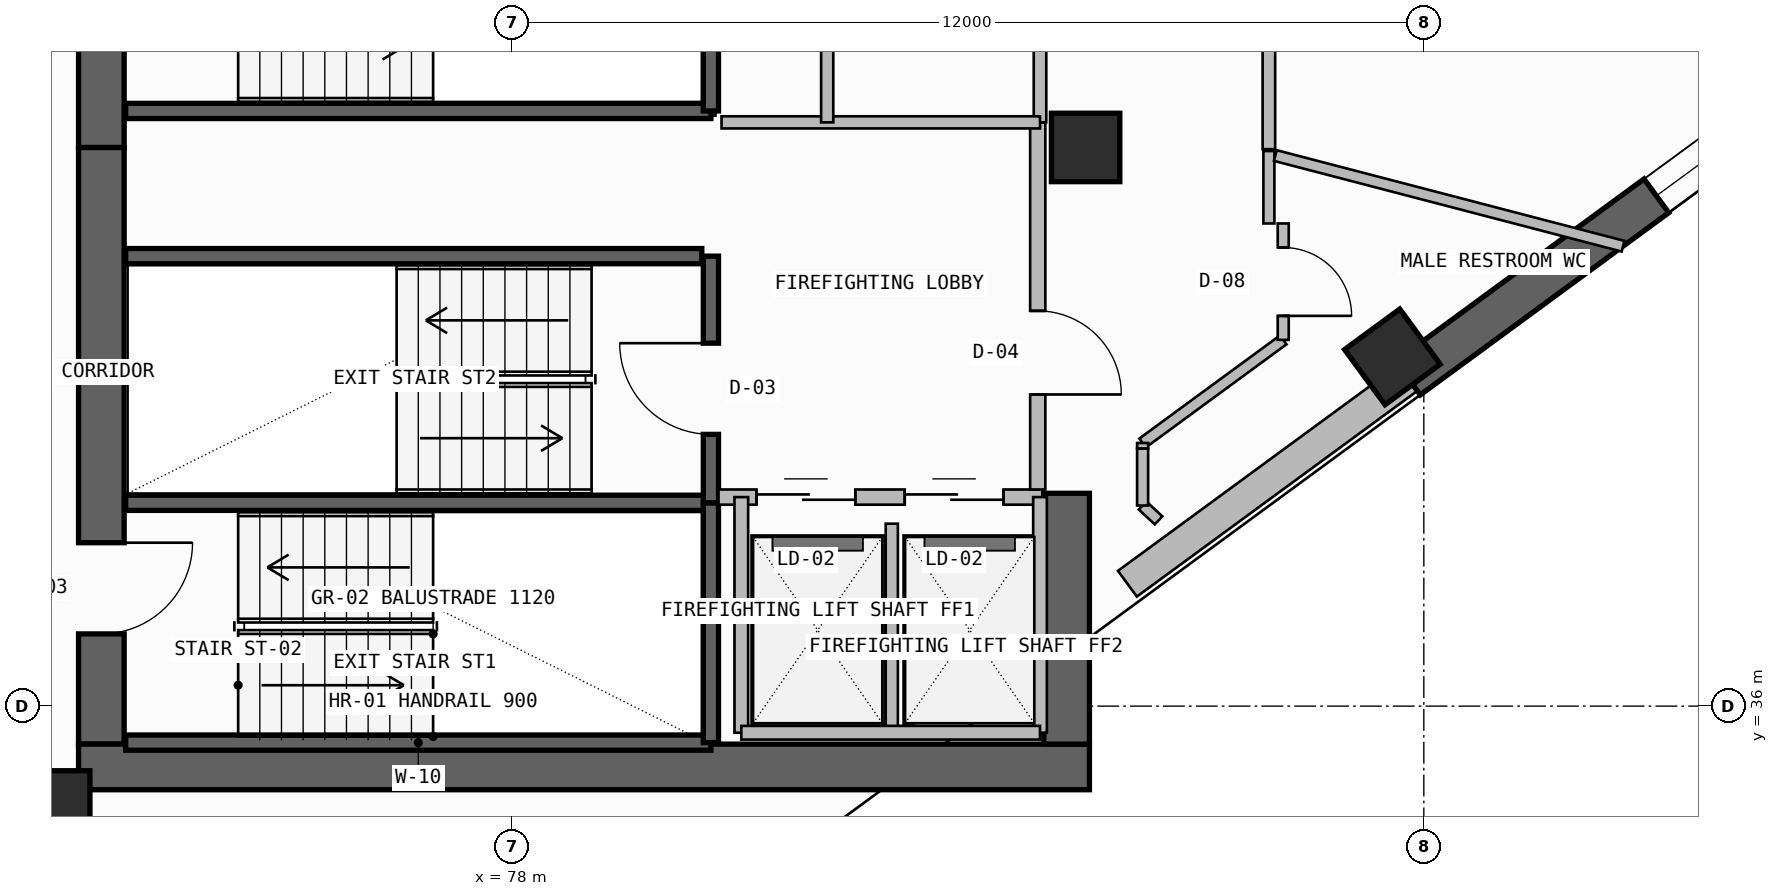
"""IFC4 building model, lengths in metres.
Left out: names, types, materials, properties, quantities, classifications, styles, units other than length and angle.
Written with IfcOpenShell. Run it as: python <this file> out.ifc"""

import sys

from ifc_helpers import new_model, si_unit, direction, frame, frame_2d, origin, origin_2d, place, context, subcontext, project, spatial, rectangle, extrude, element, fill, save


model = new_model("IFC4")
c1 = context("Model", 3, precision=1e-05, world=origin(), true_north=direction((0.0, 1.0)))
c2 = subcontext(c1, "Body", "Model", "MODEL_VIEW")
j1 = project(units=[si_unit("LENGTHUNIT", "METRE"), si_unit("PLANEANGLEUNIT", "RADIAN")], contexts=[c1])
p1 = place(None, origin())
s1 = spatial("IfcSite", under=j1, at=p1, CompositionType="ELEMENT")
p2 = place(p1, origin())
s2 = spatial("IfcBuilding", under=s1, at=p2, CompositionType="ELEMENT")
p3 = place(p2, frame((0.0, 0.0, 257.22)))
s3 = spatial("IfcBuildingStorey", under=s2, at=p3, CompositionType="ELEMENT", Elevation=257.22)
p4 = place(p3, frame((72.6, 35.5, -0.26), z_axis=(0.0, 0.0, 1.0), x_axis=(0.0, 1.0, 0.0)))
e1 = element("IfcWall", 1, at=p4, inside=s3, PredefinedType="SHEAR", context=c2, shape_type="SweptSolid", body=[
    extrude(rectangle(XDim=7.85, YDim=0.6, at=frame_2d((3.925, 0.0))), origin(), (0.0, 0.0, 1.0), 3.52),
])
p5 = place(p4, frame((1.45, 0.0, 0.26)))
e2 = element("IfcOpeningElement", 2, at=p5, cuts=e1, PredefinedType="OPENING", context=c2, shape_type="SweptSolid", body=[
    extrude(rectangle(XDim=1.2, YDim=2.2, at=frame_2d((0.6, 1.1))), frame((0.0, 0.31, 0.0), z_axis=(0.0, -1.0, 0.0), x_axis=(1.0, 0.0, 0.0)), (0.0, 0.0, 1.0), 0.62),
])
p6 = place(p3, frame((72.3, 35.2, -0.26), z_axis=(0.0, 0.0, 1.0), x_axis=(1.0, 0.0, 0.0)))
e3 = element("IfcWall", 3, at=p6, inside=s3, PredefinedType="SHEAR", context=c2, shape_type="SweptSolid", body=[
    extrude(rectangle(XDim=13.3, YDim=0.6, at=frame_2d((6.65, 0.0))), origin(), (0.0, 0.0, 1.0), 3.52),
])
p7 = place(p3, frame((85.3, 35.5, -0.26), z_axis=(0.0, 0.0, 1.0), x_axis=(0.0, 1.0, 0.0)))
e4 = element("IfcWall", 4, at=p7, inside=s3, PredefinedType="SHEAR", context=c2, shape_type="SweptSolid", body=[
    extrude(rectangle(XDim=3.3, YDim=0.6, at=frame_2d((1.65, 0.0))), origin(), (0.0, 0.0, 1.0), 3.52),
])
p8 = place(p3, frame((72.6, 43.35, -0.26), z_axis=(0.0, 0.0, 1.0), x_axis=(0.0, 1.0, 0.0)))
e5 = element("IfcWall", 5, at=p8, inside=s3, PredefinedType="SHEAR", context=c2, shape_type="SweptSolid", body=[
    extrude(rectangle(XDim=12.7, YDim=0.6, at=frame_2d((6.35, 0.0))), origin(), (0.0, 0.0, 1.0), 3.52),
])
p9 = place(p8, frame((1.35, 0.0, 0.26)))
e6 = element("IfcOpeningElement", 6, at=p9, cuts=e5, PredefinedType="OPENING", context=c2, shape_type="SweptSolid", body=[
    extrude(rectangle(XDim=1.2, YDim=2.2, at=frame_2d((0.6, 1.1))), frame((0.0, 0.31, 0.0), z_axis=(0.0, -1.0, 0.0), x_axis=(1.0, 0.0, 0.0)), (0.0, 0.0, 1.0), 0.62),
])
for number, where, z_axis, x_axis in (
    (7, (72.0, 34.7, 0.0), (0.0, 0.0, 1.0), (1.0, 0.0, 0.0)),
    (8, (85.55, 43.35, 0.0), (0.0, 0.0, 1.0), (1.0, 0.0, 0.0)),
    (9, (89.586, 40.594, 0.0), (0.0, 0.0, 1.0), (0.806, 0.591, 0.0)),
):
    element("IfcColumn", number, at=place(p3, frame(where, z_axis=z_axis, x_axis=x_axis)), inside=s3, PredefinedType="COLUMN", context=c2, shape_type="SweptSolid", body=[
        extrude(rectangle(XDim=0.9, YDim=0.9, at=origin_2d()), origin(), (0.0, 0.0, 1.0), 3.52),
    ])
p10 = place(p3, frame((86.1, 37.61, 0.0), z_axis=(0.0, 0.0, 1.0), x_axis=(0.806432132361, 0.591326657521, 0.0)))
e10 = element("IfcWall", 10, at=p10, inside=s3, PredefinedType="SOLIDWALL", context=c2, shape_type="SweptSolid", body=[
    extrude(rectangle(XDim=4.576, YDim=0.42, at=frame_2d((2.288, 0.0))), origin(), (0.0, 0.0, 1.0), 2.245),
])
p11 = place(p3, frame((89.791, 40.316, -0.26), z_axis=(0.0, 0.0, 1.0), x_axis=(0.806449218078, 0.591303355868, 0.0)))
e11 = element("IfcWall", 11, at=p11, inside=s3, PredefinedType="SHEAR", context=c2, shape_type="SweptSolid", body=[
    extrude(rectangle(XDim=16.673, YDim=0.55, at=frame_2d((8.336, 0.0))), origin(), (0.0, 0.0, 1.0), 3.52),
])
p12 = place(p11, frame((4.054, 0.0, 1.1)))
e12 = element("IfcOpeningElement", 12, at=p12, cuts=e11, PredefinedType="OPENING", context=c2, shape_type="SweptSolid", body=[
    extrude(rectangle(XDim=2.4, YDim=1.2, at=frame_2d((1.2, 0.6))), frame((0.0, 0.285, 0.0), z_axis=(0.0, -1.0, 0.0), x_axis=(1.0, 0.0, 0.0)), (0.0, 0.0, 1.0), 0.57),
])
for number, where, z_axis, x_axis in (
    (13, (72.92, 35.52, -0.26), (0.0, 0.0, 1.0), (1.0, 0.0, 0.0)),
    (14, (72.92, 38.675, -0.26), (0.0, 0.0, 1.0), (1.0, 0.0, 0.0)),
):
    element("IfcWall", number, at=place(p3, frame(where, z_axis=z_axis, x_axis=x_axis)), inside=s3, PredefinedType="SOLIDWALL", context=c2, shape_type="SweptSolid", body=[
        extrude(rectangle(XDim=7.7, YDim=0.2, at=frame_2d((3.85, 0.0))), origin(), (0.0, 0.0, 1.0), 3.52),
    ])
p13 = place(p3, frame((80.62, 35.52, -0.26), z_axis=(0.0, 0.0, 1.0), x_axis=(0.0, 1.0, 0.0)))
e15 = element("IfcWall", 15, at=p13, inside=s3, PredefinedType="SOLIDWALL", context=c2, shape_type="SweptSolid", body=[
    extrude(rectangle(XDim=3.155, YDim=0.2, at=frame_2d((1.578, 0.0))), origin(), (0.0, 0.0, 1.0), 3.52),
])
p14 = place(p3, frame((80.62, 38.675, -0.26), z_axis=(0.0, 0.0, 1.0), x_axis=(0.0, 1.0, 0.0)))
e16 = element("IfcWall", 16, at=p14, inside=s3, PredefinedType="SOLIDWALL", context=c2, shape_type="SweptSolid", body=[
    extrude(rectangle(XDim=3.245, YDim=0.2, at=frame_2d((1.623, 0.0))), origin(), (0.0, 0.0, 1.0), 3.52),
])
p15 = place(p14, frame((0.9, 0.0, 0.26)))
e17 = element("IfcOpeningElement", 17, at=p15, cuts=e16, PredefinedType="OPENING", context=c2, shape_type="SweptSolid", body=[
    extrude(rectangle(XDim=1.2, YDim=2.2, at=frame_2d((0.6, 1.1))), frame((0.0, 0.11, 0.0), z_axis=(0.0, -1.0, 0.0), x_axis=(1.0, 0.0, 0.0)), (0.0, 0.0, 1.0), 0.22),
])
p16 = place(p3, frame((80.72, 38.75, 0.0), z_axis=(0.0, 0.0, 1.0), x_axis=(1.0, 0.0, 0.0)))
e18 = element("IfcWall", 18, at=p16, inside=s3, PredefinedType="SOLIDWALL", context=c2, shape_type="SweptSolid", body=[
    extrude(rectangle(XDim=4.26, YDim=0.2, at=frame_2d((2.13, 0.0))), origin(), (0.0, 0.0, 1.0), 3.26),
])
p17 = place(p16, frame((0.5, 0.0, 0.0)))
e19 = element("IfcOpeningElement", 19, at=p17, cuts=e18, PredefinedType="OPENING", context=c2, shape_type="SweptSolid", body=[
    extrude(rectangle(XDim=1.3, YDim=2.3, at=frame_2d((0.65, 1.15))), frame((0.0, 0.11, 0.0), z_axis=(0.0, -1.0, 0.0), x_axis=(1.0, 0.0, 0.0)), (0.0, 0.0, 1.0), 0.22),
])
p18 = place(p16, frame((2.45, 0.0, 0.0)))
e20 = element("IfcOpeningElement", 20, at=p18, cuts=e18, PredefinedType="OPENING", context=c2, shape_type="SweptSolid", body=[
    extrude(rectangle(XDim=1.3, YDim=2.3, at=frame_2d((0.65, 1.15))), frame((0.0, 0.11, 0.0), z_axis=(0.0, -1.0, 0.0), x_axis=(1.0, 0.0, 0.0)), (0.0, 0.0, 1.0), 0.22),
])
p19 = place(p3, frame((83.0, 35.65, 0.0), z_axis=(0.0, 0.0, 1.0), x_axis=(0.0, 1.0, 0.0)))
e21 = element("IfcWall", 21, at=p19, inside=s3, PredefinedType="PLUMBINGWALL", context=c2, shape_type="SweptSolid", body=[
    extrude(rectangle(XDim=2.75, YDim=0.16, at=frame_2d((1.375, 0.0))), origin(), (0.0, 0.0, 1.0), 3.26),
])
for number, where, z_axis, x_axis in (
    (22, (84.95, 35.65, 0.0), (0.0, 0.0, 1.0), (0.0, 1.0, 0.0)),
    (23, (81.02, 35.65, 0.0), (0.0, 0.0, 1.0), (0.0, 1.0, 0.0)),
):
    element("IfcWall", number, at=place(p3, frame(where, z_axis=z_axis, x_axis=x_axis)), inside=s3, PredefinedType="SOLIDWALL", context=c2, shape_type="SweptSolid", body=[
        extrude(rectangle(XDim=3.1, YDim=0.18, at=frame_2d((1.55, 0.0))), origin(), (0.0, 0.0, 1.0), 3.26),
    ])
p20 = place(p3, frame((81.02, 35.65, 0.0), z_axis=(0.0, 0.0, 1.0), x_axis=(1.0, 0.0, 0.0)))
e24 = element("IfcWall", 24, at=p20, inside=s3, PredefinedType="SOLIDWALL", context=c2, shape_type="SweptSolid", body=[
    extrude(rectangle(XDim=3.93, YDim=0.18, at=frame_2d((1.965, 0.0))), origin(), (0.0, 0.0, 1.0), 3.26),
])
p21 = place(p3, frame((84.92, 38.85, 0.0), z_axis=(0.0, 0.0, 1.0), x_axis=(0.0, 1.0, 0.0)))
e25 = element("IfcWall", 25, at=p21, inside=s3, PredefinedType="SOLIDWALL", context=c2, shape_type="SweptSolid", body=[
    extrude(rectangle(XDim=4.83, YDim=0.2, at=frame_2d((2.415, 0.0))), origin(), (0.0, 0.0, 1.0), 3.26),
])
p22 = place(p21, frame((1.25, 0.0, 0.0)))
e26 = element("IfcOpeningElement", 26, at=p22, cuts=e25, PredefinedType="OPENING", context=c2, shape_type="SweptSolid", body=[
    extrude(rectangle(XDim=1.1, YDim=2.2, at=frame_2d((0.55, 1.1))), frame((0.0, 0.11, 0.0), z_axis=(0.0, -1.0, 0.0), x_axis=(1.0, 0.0, 0.0)), (0.0, 0.0, 1.0), 0.22),
])
p23 = place(p3, frame((72.92, 41.92, -0.26), z_axis=(0.0, 0.0, 1.0), x_axis=(1.0, 0.0, 0.0)))
e27 = element("IfcWall", 27, at=p23, inside=s3, PredefinedType="SOLIDWALL", context=c2, shape_type="SweptSolid", body=[
    extrude(rectangle(XDim=7.58, YDim=0.2, at=frame_2d((3.79, 0.0))), origin(), (0.0, 0.0, 1.0), 3.52),
])
p24 = place(p3, frame((72.92, 43.83, -0.26), z_axis=(0.0, 0.0, 1.0), x_axis=(1.0, 0.0, 0.0)))
e28 = element("IfcWall", 28, at=p24, inside=s3, PredefinedType="SOLIDWALL", context=c2, shape_type="SweptSolid", body=[
    extrude(rectangle(XDim=7.7, YDim=0.2, at=frame_2d((3.85, 0.0))), origin(), (0.0, 0.0, 1.0), 3.52),
])
p25 = place(p3, frame((80.62, 43.83, -0.26), z_axis=(0.0, 0.0, 1.0), x_axis=(0.0, 1.0, 0.0)))
e29 = element("IfcWall", 29, at=p25, inside=s3, PredefinedType="SOLIDWALL", context=c2, shape_type="SweptSolid", body=[
    extrude(rectangle(XDim=3.24, YDim=0.2, at=frame_2d((1.62, 0.0))), origin(), (0.0, 0.0, 1.0), 3.52),
])
p26 = place(p3, frame((84.95, 43.68, 0.0), z_axis=(0.0, 0.0, 1.0), x_axis=(0.0, 1.0, 0.0)))
e30 = element("IfcWall", 30, at=p26, inside=s3, PredefinedType="PLUMBINGWALL", context=c2, shape_type="SweptSolid", body=[
    extrude(rectangle(XDim=1.9, YDim=0.165, at=frame_2d((0.95, 0.0))), origin(), (0.0, 0.0, 1.0), 3.26),
])
p27 = place(p3, frame((80.76, 43.68, 0.0), z_axis=(0.0, 0.0, 1.0), x_axis=(1.0, 0.0, 0.0)))
e31 = element("IfcWall", 31, at=p27, inside=s3, PredefinedType="PLUMBINGWALL", context=c2, shape_type="SweptSolid", body=[
    extrude(rectangle(XDim=4.19, YDim=0.16, at=frame_2d((2.095, 0.0))), origin(), (0.0, 0.0, 1.0), 3.26),
])
p28 = place(p3, frame((82.15, 43.68, 0.0), z_axis=(0.0, 0.0, 1.0), x_axis=(0.0, 1.0, 0.0)))
e32 = element("IfcWall", 32, at=p28, inside=s3, PredefinedType="PLUMBINGWALL", context=c2, shape_type="SweptSolid", body=[
    extrude(rectangle(XDim=1.9, YDim=0.16, at=frame_2d((0.95, 0.0))), origin(), (0.0, 0.0, 1.0), 3.26),
])
p29 = place(p3, frame((86.3, 39.462, 0.0), z_axis=(0.0, 0.0, 1.0), x_axis=(0.80642868075, 0.591331364689, 0.0)))
e33 = element("IfcWall", 33, at=p29, inside=s3, PredefinedType="PARTITIONING", context=c2, shape_type="SweptSolid", body=[
    extrude(rectangle(XDim=2.294, YDim=0.145, at=frame_2d((1.147, 0.0))), origin(), (0.0, 0.0, 1.0), 3.26),
])
p30 = place(p3, frame((88.15, 40.818, 0.0), z_axis=(0.0, 0.0, 1.0), x_axis=(0.0, 1.0, 0.0)))
e34 = element("IfcWall", 34, at=p30, inside=s3, PredefinedType="PARTITIONING", context=c2, shape_type="SweptSolid", body=[
    extrude(rectangle(XDim=1.532, YDim=0.145, at=frame_2d((0.766, 0.0))), origin(), (0.0, 0.0, 1.0), 2.745),
])
p31 = place(p30, frame((0.316, 0.0, 0.0)))
e35 = element("IfcOpeningElement", 35, at=p31, cuts=e34, PredefinedType="OPENING", context=c2, shape_type="SweptSolid", body=[
    extrude(rectangle(XDim=0.9, YDim=2.1, at=frame_2d((0.45, 1.05))), frame((0.0, 0.083, 0.0), z_axis=(0.0, -1.0, 0.0), x_axis=(1.0, 0.0, 0.0)), (0.0, 0.0, 1.0), 0.165),
])
p32 = place(p3, frame((87.961, 42.35, 0.0), z_axis=(0.0, 0.0, 1.0), x_axis=(0.0, 1.0, 0.0)))
e36 = element("IfcWall", 36, at=p32, inside=s3, PredefinedType="PARTITIONING", context=c2, shape_type="SweptSolid", body=[
    extrude(rectangle(XDim=0.953, YDim=0.145, at=frame_2d((0.476, 0.0))), origin(), (0.0, 0.0, 1.0), 2.885),
])
p33 = place(p3, frame((86.3, 39.388, 0.0), z_axis=(0.0, 0.0, 1.0), x_axis=(0.0, 1.0, 0.0)))
e37 = element("IfcWall", 37, at=p33, inside=s3, PredefinedType="PARTITIONING", context=c2, shape_type="SweptSolid", body=[
    extrude(rectangle(XDim=0.074, YDim=0.145, at=frame_2d((0.037, 0.0))), origin(), (0.0, 0.0, 1.0), 3.26),
])
p34 = place(p3, frame((88.046, 43.244, 0.0), z_axis=(0.0, 0.0, 1.0), x_axis=(0.967651260869, -0.252291572071, 0.0)))
e38 = element("IfcWall", 38, at=p34, inside=s3, PredefinedType="PARTITIONING", context=c2, shape_type="SweptSolid", body=[
    extrude(rectangle(XDim=4.728, YDim=0.145, at=frame_2d((2.364, 0.0))), origin(), (0.0, 0.0, 1.0), 2.245),
])
p35 = place(p3, frame((87.961, 43.327, 0.0), z_axis=(0.0, 0.0, 1.0), x_axis=(0.0, 1.0, 0.0)))
e39 = element("IfcWall", 39, at=p35, inside=s3, PredefinedType="PARTITIONING", context=c2, shape_type="SweptSolid", body=[
    extrude(rectangle(XDim=2.323, YDim=0.165, at=frame_2d((1.161, 0.0))), origin(), (0.0, 0.0, 1.0), 2.745),
])
p36 = place(p3, frame((86.51, 38.444, 0.0), z_axis=(0.0, 0.0, 1.0), x_axis=(-0.732216394955, 0.681072060034, 0.0)))
e40 = element("IfcWall", 40, at=p36, inside=s3, PredefinedType="PARTITIONING", context=c2, shape_type="SweptSolid", body=[
    extrude(rectangle(XDim=0.286, YDim=0.145, at=frame_2d((0.143, 0.0))), origin(), (0.0, 0.0, 1.0), 3.26),
])
p37 = place(p3, frame((86.3, 38.639, 0.0), z_axis=(0.0, 0.0, 1.0), x_axis=(0.0, 1.0, 0.0)))
e41 = element("IfcWall", 41, at=p37, inside=s3, PredefinedType="PARTITIONING", context=c2, shape_type="SweptSolid", body=[
    extrude(rectangle(XDim=0.749, YDim=0.145, at=frame_2d((0.374, 0.0))), origin(), (0.0, 0.0, 1.0), 3.26),
])
p38 = place(p12, origin())
e42 = element("IfcWindow", 42, at=p38, inside=s3, PartitioningType="SINGLE_PANEL", PredefinedType="WINDOW", context=c2, shape_type="SweptSolid", body=[
    extrude(rectangle(XDim=2.4, YDim=1.2, at=frame_2d((1.2, 0.6))), frame((0.0, 0.03, 0.0), z_axis=(0.0, -1.0, 0.0), x_axis=(1.0, 0.0, 0.0)), (0.0, 0.0, 1.0), 0.06),
])
fill(e12, e42)
p39 = place(p5, frame((1.2, 0.0, 0.0), z_axis=(0.0, 0.0, 1.0), x_axis=(-1.0, 0.0, 0.0)))
e43 = element("IfcDoor", 43, at=p39, inside=s3, OperationType="SINGLE_SWING_LEFT", PredefinedType="USERDEFINED", context=c2, shape_type="SweptSolid", body=[
    extrude(rectangle(XDim=1.2, YDim=2.2, at=frame_2d((0.6, 1.1))), frame((0.0, 0.025, 0.0), z_axis=(0.0, -1.0, 0.0), x_axis=(1.0, 0.0, 0.0)), (0.0, 0.0, 1.0), 0.05),
])
fill(e2, e43)
p40 = place(p15, origin())
e44 = element("IfcDoor", 44, at=p40, inside=s3, OperationType="SINGLE_SWING_RIGHT", PredefinedType="USERDEFINED", context=c2, shape_type="SweptSolid", body=[
    extrude(rectangle(XDim=1.2, YDim=2.2, at=frame_2d((0.6, 1.1))), frame((0.0, 0.025, 0.0), z_axis=(0.0, -1.0, 0.0), x_axis=(1.0, 0.0, 0.0)), (0.0, 0.0, 1.0), 0.05),
])
fill(e17, e44)
p41 = place(p17, origin())
e45 = element("IfcDoor", 45, at=p41, inside=s3, OperationType="DOUBLE_DOOR_SLIDING", PredefinedType="DOOR", context=c2, shape_type="SweptSolid", body=[
    extrude(rectangle(XDim=1.3, YDim=2.3, at=frame_2d((0.65, 1.15))), frame((0.0, 0.025, 0.0), z_axis=(0.0, -1.0, 0.0), x_axis=(1.0, 0.0, 0.0)), (0.0, 0.0, 1.0), 0.05),
])
fill(e19, e45)
p42 = place(p18, origin())
e46 = element("IfcDoor", 46, at=p42, inside=s3, OperationType="DOUBLE_DOOR_SLIDING", PredefinedType="DOOR", context=c2, shape_type="SweptSolid", body=[
    extrude(rectangle(XDim=1.3, YDim=2.3, at=frame_2d((0.65, 1.15))), frame((0.0, 0.025, 0.0), z_axis=(0.0, -1.0, 0.0), x_axis=(1.0, 0.0, 0.0)), (0.0, 0.0, 1.0), 0.05),
])
fill(e20, e46)
p43 = place(p22, frame((1.1, 0.0, 0.0), z_axis=(0.0, 0.0, 1.0), x_axis=(-1.0, 0.0, 0.0)))
e47 = element("IfcDoor", 47, at=p43, inside=s3, OperationType="SINGLE_SWING_RIGHT", PredefinedType="DOOR", context=c2, shape_type="SweptSolid", body=[
    extrude(rectangle(XDim=1.1, YDim=2.2, at=frame_2d((0.55, 1.1))), frame((0.0, 0.025, 0.0), z_axis=(0.0, -1.0, 0.0), x_axis=(1.0, 0.0, 0.0)), (0.0, 0.0, 1.0), 0.05),
])
fill(e26, e47)
p44 = place(p31, frame((0.9, 0.0, 0.0), z_axis=(0.0, 0.0, 1.0), x_axis=(-1.0, 0.0, 0.0)))
e48 = element("IfcDoor", 48, at=p44, inside=s3, OperationType="SINGLE_SWING_RIGHT", PredefinedType="DOOR", context=c2, shape_type="SweptSolid", body=[
    extrude(rectangle(XDim=0.9, YDim=2.1, at=frame_2d((0.45, 1.05))), frame((0.0, 0.025, 0.0), z_axis=(0.0, -1.0, 0.0), x_axis=(1.0, 0.0, 0.0)), (0.0, 0.0, 1.0), 0.05),
])
fill(e35, e48)
save(model, sys.argv[1])
